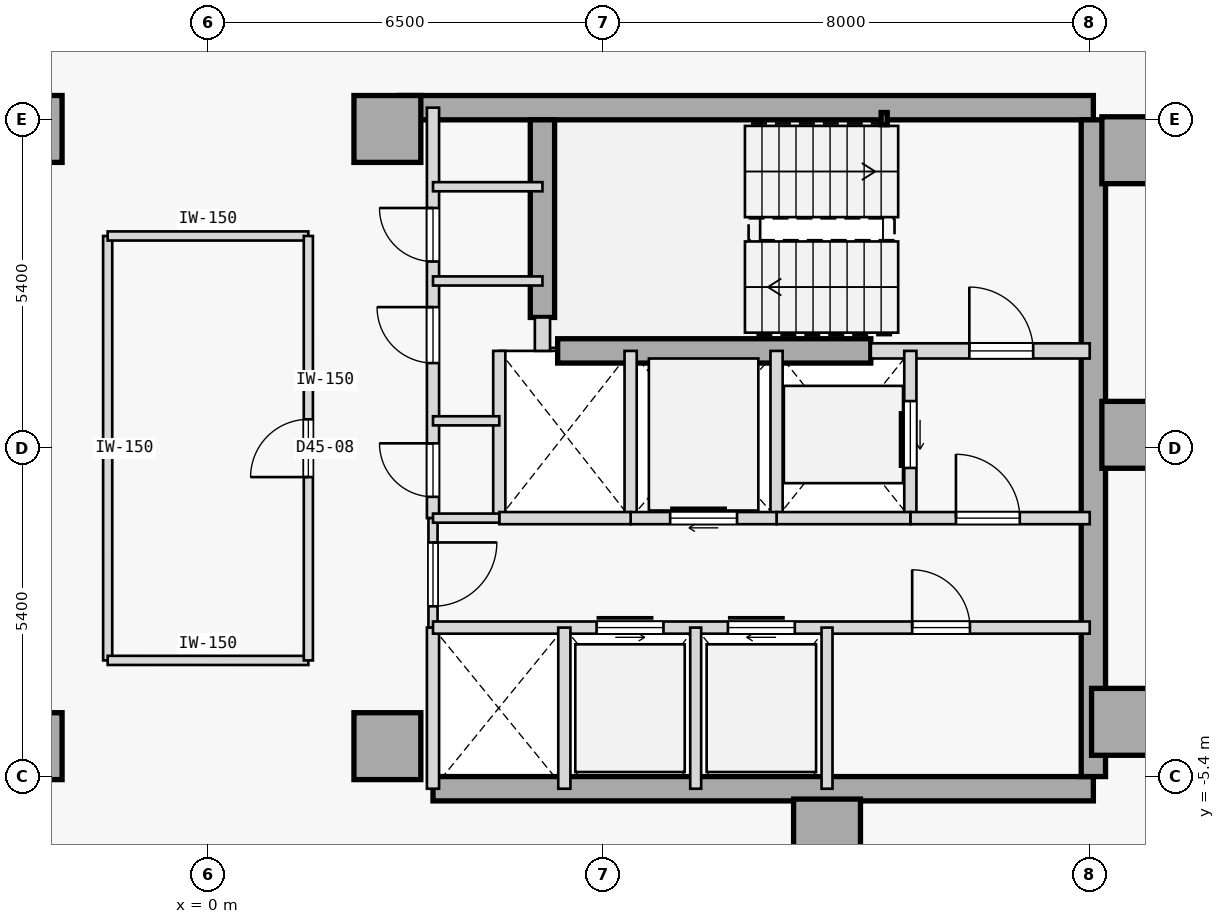
"""IFC4 building model, lengths in metres.
Left out: names, types, materials, properties, quantities, classifications, styles, units other than length and angle.
Written with IfcOpenShell. Run it as: python <this file> out.ifc"""

import sys

from ifc_helpers import new_model, si_unit, direction, frame, frame_2d, origin, origin_2d, place, context, subcontext, project, spatial, rectangle, hollow_rectangle, extrude, element, fill, save


model = new_model("IFC4")
c1 = context("Model", 3, precision=1e-05, world=origin(), true_north=direction((0.0, 1.0)))
c2 = subcontext(c1, "Body", "Model", "MODEL_VIEW")
j1 = project(units=[si_unit("LENGTHUNIT", "METRE"), si_unit("PLANEANGLEUNIT", "RADIAN")], contexts=[c1])
p1 = place(None, origin())
s1 = spatial("IfcSite", under=j1, at=p1, CompositionType="ELEMENT")
p2 = place(p1, origin())
s2 = spatial("IfcBuilding", under=s1, at=p2, CompositionType="ELEMENT")
p3 = place(p2, frame((0.0, 0.0, 175.2)))
s3 = spatial("IfcBuildingStorey", under=s2, at=p3, CompositionType="ELEMENT", Elevation=175.2)
for number, where, z_axis, x_axis in (
    (1, (-2.95, -4.9, 0.0), (0.0, 0.0, 1.0), (1.0, 0.0, 0.0)),
    (2, (-2.95, 5.25, 0.0), (0.0, 0.0, 1.0), (1.0, 0.0, 0.0)),
    (3, (15.25, 4.9, 0.0), (0.0, 0.0, 1.0), (1.0, 0.0, 0.0)),
    (4, (15.25, 0.22, 0.0), (0.0, 0.0, 1.0), (1.0, 0.0, 0.0)),
    (5, (15.08, -4.5, 0.0), (0.0, 0.0, 1.0), (1.0, 0.0, 0.0)),
    (6, (10.18, -6.32, 0.0), (0.0, 0.0, 1.0), (1.0, 0.0, 0.0)),
    (7, (2.95, -4.9, 0.0), (0.0, 0.0, 1.0), (1.0, 0.0, 0.0)),
    (8, (2.95, 5.25, 0.0), (0.0, 0.0, 1.0), (1.0, 0.0, 0.0)),
):
    element("IfcColumn", number, at=place(p3, frame(where, z_axis=z_axis, x_axis=x_axis)), inside=s3, PredefinedType="COLUMN", context=c2, shape_type="SweptSolid", body=[
        extrude(rectangle(XDim=1.1, YDim=1.1, at=origin_2d()), origin(), (0.0, 0.0, 1.0), 3.4),
    ])
p4 = place(p3, frame((3.15, 5.6, 0.0), z_axis=(0.0, 0.0, 1.0), x_axis=(1.0, 0.0, 0.0)))
e9 = element("IfcWall", 9, at=p4, inside=s3, PredefinedType="SHEAR", context=c2, shape_type="SweptSolid", body=[
    extrude(rectangle(XDim=11.41, YDim=0.4, at=frame_2d((5.705, 0.0))), origin(), (0.0, 0.0, 1.0), 3.175),
])
p5 = place(p3, frame((3.7, -5.6, 0.0), z_axis=(0.0, 0.0, 1.0), x_axis=(1.0, 0.0, 0.0)))
e10 = element("IfcWall", 10, at=p5, inside=s3, PredefinedType="SHEAR", context=c2, shape_type="SweptSolid", body=[
    extrude(rectangle(XDim=10.86, YDim=0.4, at=frame_2d((5.43, 0.0))), origin(), (0.0, 0.0, 1.0), 3.175),
])
p6 = place(p3, frame((14.56, -5.4, 0.0), z_axis=(0.0, 0.0, 1.0), x_axis=(0.0, 1.0, 0.0)))
e11 = element("IfcWall", 11, at=p6, inside=s3, PredefinedType="SHEAR", context=c2, shape_type="SweptSolid", body=[
    extrude(rectangle(XDim=10.8, YDim=0.4, at=frame_2d((5.4, 0.0))), origin(), (0.0, 0.0, 1.0), 3.175),
])
p7 = place(p3, frame((5.5, 2.15, 0.0), z_axis=(0.0, 0.0, 1.0), x_axis=(0.0, 1.0, 0.0)))
e12 = element("IfcWall", 12, at=p7, inside=s3, PredefinedType="SHEAR", context=c2, shape_type="SweptSolid", body=[
    extrude(rectangle(XDim=3.25, YDim=0.4, at=frame_2d((1.625, 0.0))), origin(), (0.0, 0.0, 1.0), 3.175),
])
p8 = place(p3, frame((5.75, 1.6, 0.0), z_axis=(0.0, 0.0, 1.0), x_axis=(1.0, 0.0, 0.0)))
e13 = element("IfcWall", 13, at=p8, inside=s3, PredefinedType="SHEAR", context=c2, shape_type="SweptSolid", body=[
    extrude(rectangle(XDim=5.15, YDim=0.4, at=frame_2d((2.575, 0.0))), origin(), (0.0, 0.0, 1.0), 3.175),
])
p9 = place(p3, frame((11.12, 5.42, 0.0), z_axis=(0.0, 0.0, 1.0), x_axis=(1.0, 0.0, 0.0)))
e14 = element("IfcColumn", 14, at=p9, inside=s3, PredefinedType="COLUMN", context=c2, shape_type="SweptSolid", body=[
    extrude(hollow_rectangle(XDim=0.1, YDim=0.2, WallThickness=0.008, at=origin_2d()), origin(), (0.0, 0.0, 1.0), 3.4),
])
p10 = place(p3, frame((10.9, 1.6, 0.0), z_axis=(0.0, 0.0, 1.0), x_axis=(1.0, 0.0, 0.0)))
e15 = element("IfcWall", 15, at=p10, inside=s3, PredefinedType="STANDARD", context=c2, shape_type="SweptSolid", body=[
    extrude(rectangle(XDim=3.6, YDim=0.25, at=frame_2d((1.8, 0.0))), origin(), (0.0, 0.0, 1.0), 3.175),
])
p11 = place(p10, frame((1.62, 0.0, 0.0)))
e16 = element("IfcOpeningElement", 16, at=p11, cuts=e15, PredefinedType="OPENING", context=c2, shape_type="SweptSolid", body=[
    extrude(rectangle(XDim=1.05, YDim=2.15, at=frame_2d((0.525, 1.075))), frame((0.0, 0.135, 0.0), z_axis=(0.0, -1.0, 0.0), x_axis=(1.0, 0.0, 0.0)), (0.0, 0.0, 1.0), 0.27),
])
p12 = place(p3, frame((5.5, 1.6, 0.0), z_axis=(0.0, 0.0, 1.0), x_axis=(0.0, 1.0, 0.0)))
e17 = element("IfcWall", 17, at=p12, inside=s3, PredefinedType="STANDARD", context=c2, shape_type="SweptSolid", body=[
    extrude(rectangle(XDim=0.55, YDim=0.25, at=frame_2d((0.275, 0.0))), origin(), (0.0, 0.0, 1.0), 3.175),
])
p13 = place(p3, frame((3.7, -1.15, 0.0), z_axis=(0.0, 0.0, 1.0), x_axis=(0.0, 1.0, 0.0)))
e18 = element("IfcWall", 18, at=p13, inside=s3, PredefinedType="STANDARD", context=c2, shape_type="SweptSolid", body=[
    extrude(rectangle(XDim=6.75, YDim=0.2, at=frame_2d((3.375, 0.0))), origin(), (0.0, 0.0, 1.0), 3.175),
])
p14 = place(p13, frame((0.35, 0.0, 0.0)))
e19 = element("IfcOpeningElement", 19, at=p14, cuts=e18, PredefinedType="OPENING", context=c2, shape_type="SweptSolid", body=[
    extrude(rectangle(XDim=0.88, YDim=2.15, at=frame_2d((0.44, 1.075))), frame((0.0, 0.11, 0.0), z_axis=(0.0, -1.0, 0.0), x_axis=(1.0, 0.0, 0.0)), (0.0, 0.0, 1.0), 0.22),
])
p15 = place(p13, frame((2.55, 0.0, 0.0)))
e20 = element("IfcOpeningElement", 20, at=p15, cuts=e18, PredefinedType="OPENING", context=c2, shape_type="SweptSolid", body=[
    extrude(rectangle(XDim=0.92, YDim=2.15, at=frame_2d((0.46, 1.075))), frame((0.0, 0.11, 0.0), z_axis=(0.0, -1.0, 0.0), x_axis=(1.0, 0.0, 0.0)), (0.0, 0.0, 1.0), 0.22),
])
p16 = place(p13, frame((4.22, 0.0, 0.0)))
e21 = element("IfcOpeningElement", 21, at=p16, cuts=e18, PredefinedType="OPENING", context=c2, shape_type="SweptSolid", body=[
    extrude(rectangle(XDim=0.88, YDim=2.15, at=frame_2d((0.44, 1.075))), frame((0.0, 0.11, 0.0), z_axis=(0.0, -1.0, 0.0), x_axis=(1.0, 0.0, 0.0)), (0.0, 0.0, 1.0), 0.22),
])
p17 = place(p3, frame((3.7, -2.95, 0.0), z_axis=(0.0, 0.0, 1.0), x_axis=(0.0, 1.0, 0.0)))
e22 = element("IfcWall", 22, at=p17, inside=s3, PredefinedType="PARTITIONING", context=c2, shape_type="SweptSolid", body=[
    extrude(rectangle(XDim=1.8, YDim=0.15, at=frame_2d((0.9, 0.0))), origin(), (0.0, 0.0, 1.0), 3.175),
])
p18 = place(p17, frame((0.35, 0.0, 0.0)))
e23 = element("IfcOpeningElement", 23, at=p18, cuts=e22, PredefinedType="OPENING", context=c2, shape_type="SweptSolid", body=[
    extrude(rectangle(XDim=1.05, YDim=2.18, at=frame_2d((0.525, 1.09))), frame((0.0, 0.085, 0.0), z_axis=(0.0, -1.0, 0.0), x_axis=(1.0, 0.0, 0.0)), (0.0, 0.0, 1.0), 0.17),
])
p19 = place(p3, frame((3.7, -5.6, 0.0), z_axis=(0.0, 0.0, 1.0), x_axis=(0.0, 1.0, 0.0)))
e24 = element("IfcWall", 24, at=p19, inside=s3, PredefinedType="STANDARD", context=c2, shape_type="SweptSolid", body=[
    extrude(rectangle(XDim=2.65, YDim=0.2, at=frame_2d((1.325, 0.0))), origin(), (0.0, 0.0, 1.0), 3.175),
])
p20 = place(p3, frame((11.55, -1.15, 0.0), z_axis=(0.0, 0.0, 1.0), x_axis=(0.0, 1.0, 0.0)))
e25 = element("IfcWall", 25, at=p20, inside=s3, PredefinedType="STANDARD", context=c2, shape_type="SweptSolid", body=[
    extrude(rectangle(XDim=2.75, YDim=0.2, at=frame_2d((1.375, 0.0))), origin(), (0.0, 0.0, 1.0), 3.175),
])
p21 = place(p20, frame((0.825, 0.0, 0.0)))
e26 = element("IfcOpeningElement", 26, at=p21, cuts=e25, PredefinedType="OPENING", context=c2, shape_type="SweptSolid", body=[
    extrude(rectangle(XDim=1.1, YDim=2.15, at=frame_2d((0.55, 1.075))), frame((0.0, 0.11, 0.0), z_axis=(0.0, -1.0, 0.0), x_axis=(1.0, 0.0, 0.0)), (0.0, 0.0, 1.0), 0.22),
])
p22 = place(p3, frame((9.35, -1.15, 0.0), z_axis=(0.0, 0.0, 1.0), x_axis=(0.0, 1.0, 0.0)))
e27 = element("IfcWall", 27, at=p22, inside=s3, PredefinedType="STANDARD", context=c2, shape_type="SweptSolid", body=[
    extrude(rectangle(XDim=2.75, YDim=0.2, at=frame_2d((1.375, 0.0))), origin(), (0.0, 0.0, 1.0), 3.175),
])
p23 = place(p3, frame((11.55, -1.15, 0.0), z_axis=(0.0, 0.0, 1.0), x_axis=(1.0, 0.0, 0.0)))
e28 = element("IfcWall", 28, at=p23, inside=s3, PredefinedType="STANDARD", context=c2, shape_type="SweptSolid", body=[
    extrude(rectangle(XDim=2.95, YDim=0.2, at=frame_2d((1.475, 0.0))), origin(), (0.0, 0.0, 1.0), 3.175),
])
p24 = place(p23, frame((0.75, 0.0, 0.0)))
e29 = element("IfcOpeningElement", 29, at=p24, cuts=e28, PredefinedType="OPENING", context=c2, shape_type="SweptSolid", body=[
    extrude(rectangle(XDim=1.05, YDim=2.18, at=frame_2d((0.525, 1.09))), frame((0.0, 0.11, 0.0), z_axis=(0.0, -1.0, 0.0), x_axis=(1.0, 0.0, 0.0)), (0.0, 0.0, 1.0), 0.22),
])
p25 = place(p3, frame((9.35, -1.15, 0.0), z_axis=(0.0, 0.0, 1.0), x_axis=(1.0, 0.0, 0.0)))
e30 = element("IfcWall", 30, at=p25, inside=s3, PredefinedType="STANDARD", context=c2, shape_type="SweptSolid", body=[
    extrude(rectangle(XDim=2.2, YDim=0.2, at=frame_2d((1.1, 0.0))), origin(), (0.0, 0.0, 1.0), 3.175),
])
p26 = place(p3, frame((6.95, -1.15, 0.0), z_axis=(0.0, 0.0, 1.0), x_axis=(0.0, 1.0, 0.0)))
e31 = element("IfcWall", 31, at=p26, inside=s3, PredefinedType="STANDARD", context=c2, shape_type="SweptSolid", body=[
    extrude(rectangle(XDim=2.75, YDim=0.2, at=frame_2d((1.375, 0.0))), origin(), (0.0, 0.0, 1.0), 3.175),
])
p27 = place(p3, frame((6.95, -1.15, 0.0), z_axis=(0.0, 0.0, 1.0), x_axis=(1.0, 0.0, 0.0)))
e32 = element("IfcWall", 32, at=p27, inside=s3, PredefinedType="STANDARD", context=c2, shape_type="SweptSolid", body=[
    extrude(rectangle(XDim=2.4, YDim=0.2, at=frame_2d((1.2, 0.0))), origin(), (0.0, 0.0, 1.0), 3.175),
])
p28 = place(p27, frame((0.65, 0.0, 0.0)))
e33 = element("IfcOpeningElement", 33, at=p28, cuts=e32, PredefinedType="OPENING", context=c2, shape_type="SweptSolid", body=[
    extrude(rectangle(XDim=1.1, YDim=2.15, at=frame_2d((0.55, 1.075))), frame((0.0, 0.11, 0.0), z_axis=(0.0, -1.0, 0.0), x_axis=(1.0, 0.0, 0.0)), (0.0, 0.0, 1.0), 0.22),
])
p29 = place(p3, frame((4.79, -1.15, 0.0), z_axis=(0.0, 0.0, 1.0), x_axis=(0.0, 1.0, 0.0)))
e34 = element("IfcWall", 34, at=p29, inside=s3, PredefinedType="STANDARD", context=c2, shape_type="SweptSolid", body=[
    extrude(rectangle(XDim=2.75, YDim=0.2, at=frame_2d((1.375, 0.0))), origin(), (0.0, 0.0, 1.0), 3.175),
])
p30 = place(p3, frame((4.79, -1.15, 0.0), z_axis=(0.0, 0.0, 1.0), x_axis=(1.0, 0.0, 0.0)))
e35 = element("IfcWall", 35, at=p30, inside=s3, PredefinedType="STANDARD", context=c2, shape_type="SweptSolid", body=[
    extrude(rectangle(XDim=2.16, YDim=0.2, at=frame_2d((1.08, 0.0))), origin(), (0.0, 0.0, 1.0), 3.175),
])
p31 = place(p3, frame((3.7, -1.15, 0.0), z_axis=(0.0, 0.0, 1.0), x_axis=(1.0, 0.0, 0.0)))
e36 = element("IfcWall", 36, at=p31, inside=s3, PredefinedType="PARTITIONING", context=c2, shape_type="SweptSolid", body=[
    extrude(rectangle(XDim=1.09, YDim=0.15, at=frame_2d((0.545, 0.0))), origin(), (0.0, 0.0, 1.0), 3.175),
])
p32 = place(p3, frame((3.7, -2.95, 0.0), z_axis=(0.0, 0.0, 1.0), x_axis=(1.0, 0.0, 0.0)))
e37 = element("IfcWall", 37, at=p32, inside=s3, PredefinedType="STANDARD", context=c2, shape_type="SweptSolid", body=[
    extrude(rectangle(XDim=10.8, YDim=0.2, at=frame_2d((5.4, 0.0))), origin(), (0.0, 0.0, 1.0), 3.175),
])
p33 = place(p32, frame((2.69, 0.0, 0.0)))
e38 = element("IfcOpeningElement", 38, at=p33, cuts=e37, PredefinedType="OPENING", context=c2, shape_type="SweptSolid", body=[
    extrude(rectangle(XDim=1.1, YDim=2.15, at=frame_2d((0.55, 1.075))), frame((0.0, 0.11, 0.0), z_axis=(0.0, -1.0, 0.0), x_axis=(1.0, 0.0, 0.0)), (0.0, 0.0, 1.0), 0.22),
])
p34 = place(p32, frame((4.85, 0.0, 0.0)))
e39 = element("IfcOpeningElement", 39, at=p34, cuts=e37, PredefinedType="OPENING", context=c2, shape_type="SweptSolid", body=[
    extrude(rectangle(XDim=1.1, YDim=2.15, at=frame_2d((0.55, 1.075))), frame((0.0, 0.11, 0.0), z_axis=(0.0, -1.0, 0.0), x_axis=(1.0, 0.0, 0.0)), (0.0, 0.0, 1.0), 0.22),
])
p35 = place(p32, frame((7.88, 0.0, 0.0)))
e40 = element("IfcOpeningElement", 40, at=p35, cuts=e37, PredefinedType="OPENING", context=c2, shape_type="SweptSolid", body=[
    extrude(rectangle(XDim=0.95, YDim=2.15, at=frame_2d((0.475, 1.075))), frame((0.0, 0.11, 0.0), z_axis=(0.0, -1.0, 0.0), x_axis=(1.0, 0.0, 0.0)), (0.0, 0.0, 1.0), 0.22),
])
p36 = place(p3, frame((5.86, -5.6, 0.0), z_axis=(0.0, 0.0, 1.0), x_axis=(0.0, 1.0, 0.0)))
e41 = element("IfcWall", 41, at=p36, inside=s3, PredefinedType="STANDARD", context=c2, shape_type="SweptSolid", body=[
    extrude(rectangle(XDim=2.65, YDim=0.2, at=frame_2d((1.325, 0.0))), origin(), (0.0, 0.0, 1.0), 3.175),
])
for number, where, z_axis, x_axis in (
    (42, (10.18, -5.6, 0.0), (0.0, 0.0, 1.0), (0.0, 1.0, 0.0)),
    (43, (8.02, -5.6, 0.0), (0.0, 0.0, 1.0), (0.0, 1.0, 0.0)),
):
    element("IfcWall", number, at=place(p3, frame(where, z_axis=z_axis, x_axis=x_axis)), inside=s3, PredefinedType="STANDARD", context=c2, shape_type="SweptSolid", body=[
        extrude(rectangle(XDim=2.65, YDim=0.18, at=frame_2d((1.325, 0.0))), origin(), (0.0, 0.0, 1.0), 3.175),
    ])
p37 = place(p3, frame((3.7, 4.3, 0.0), z_axis=(0.0, 0.0, 1.0), x_axis=(1.0, 0.0, 0.0)))
e44 = element("IfcWall", 44, at=p37, inside=s3, PredefinedType="PARTITIONING", context=c2, shape_type="SweptSolid", body=[
    extrude(rectangle(XDim=1.8, YDim=0.15, at=frame_2d((0.9, 0.0))), origin(), (0.0, 0.0, 1.0), 3.175),
])
p38 = place(p3, frame((3.7, 0.45, 0.0), z_axis=(0.0, 0.0, 1.0), x_axis=(1.0, 0.0, 0.0)))
e45 = element("IfcWall", 45, at=p38, inside=s3, PredefinedType="PARTITIONING", context=c2, shape_type="SweptSolid", body=[
    extrude(rectangle(XDim=1.09, YDim=0.15, at=frame_2d((0.545, 0.0))), origin(), (0.0, 0.0, 1.0), 3.175),
])
p39 = place(p3, frame((3.7, 2.75, 0.0), z_axis=(0.0, 0.0, 1.0), x_axis=(1.0, 0.0, 0.0)))
e46 = element("IfcWall", 46, at=p39, inside=s3, PredefinedType="PARTITIONING", context=c2, shape_type="SweptSolid", body=[
    extrude(rectangle(XDim=1.8, YDim=0.15, at=frame_2d((0.9, 0.0))), origin(), (0.0, 0.0, 1.0), 3.175),
])
p40 = place(p3, frame((-1.65, -3.49, 0.0), z_axis=(0.0, 0.0, 1.0), x_axis=(-3.4979712e-05, 0.999999999388, 0.0)))
e47 = element("IfcWall", 47, at=p40, inside=s3, PredefinedType="PARTITIONING", context=c2, shape_type="SweptSolid", body=[
    extrude(rectangle(XDim=6.979, YDim=0.15, at=frame_2d((3.49, 0.0))), origin(), (0.0, 0.0, 1.0), 3.175),
])
p41 = place(p3, frame((-1.65, -3.49, 0.0), z_axis=(0.0, 0.0, 1.0), x_axis=(0.999999975374, -0.000221926315, 0.0)))
e48 = element("IfcWall", 48, at=p41, inside=s3, PredefinedType="PARTITIONING", context=c2, shape_type="SweptSolid", body=[
    extrude(rectangle(XDim=3.3, YDim=0.15, at=frame_2d((1.65, 0.0))), origin(), (0.0, 0.0, 1.0), 3.175),
])
p42 = place(p3, frame((-1.65, 3.49, 0.0), z_axis=(0.0, 0.0, 1.0), x_axis=(1.0, 0.0, 0.0)))
e49 = element("IfcWall", 49, at=p42, inside=s3, PredefinedType="PARTITIONING", context=c2, shape_type="SweptSolid", body=[
    extrude(rectangle(XDim=3.3, YDim=0.15, at=frame_2d((1.65, 0.0))), origin(), (0.0, 0.0, 1.0), 3.175),
])
p43 = place(p3, frame((1.65, -3.49, 0.0), z_axis=(0.0, 0.0, 1.0), x_axis=(-6.9952083e-05, 0.999999997553, 0.0)))
e50 = element("IfcWall", 50, at=p43, inside=s3, PredefinedType="PARTITIONING", context=c2, shape_type="SweptSolid", body=[
    extrude(rectangle(XDim=6.98, YDim=0.15, at=frame_2d((3.49, 0.0))), origin(), (0.0, 0.0, 1.0), 3.175),
])
p44 = place(p43, frame((3.015, 0.0, 0.0)))
e51 = element("IfcOpeningElement", 51, at=p44, cuts=e50, PredefinedType="OPENING", context=c2, shape_type="SweptSolid", body=[
    extrude(rectangle(XDim=0.95, YDim=2.15, at=frame_2d((0.475, 1.075))), frame((0.0, 0.085, 0.0), z_axis=(0.0, -1.0, 0.0), x_axis=(1.0, 0.0, 0.0)), (0.0, 0.0, 1.0), 0.17),
])
p45 = place(p11, origin())
e52 = element("IfcDoor", 52, at=p45, inside=s3, OperationType="SINGLE_SWING_LEFT", PredefinedType="DOOR", context=c2, shape_type="SweptSolid", body=[
    extrude(rectangle(XDim=1.05, YDim=2.15, at=frame_2d((0.525, 1.075))), frame((0.0, 0.025, 0.0), z_axis=(0.0, -1.0, 0.0), x_axis=(1.0, 0.0, 0.0)), (0.0, 0.0, 1.0), 0.05),
])
fill(e16, e52)
p46 = place(p24, origin())
e53 = element("IfcDoor", 53, at=p46, inside=s3, OperationType="SINGLE_SWING_LEFT", PredefinedType="DOOR", context=c2, shape_type="SweptSolid", body=[
    extrude(rectangle(XDim=1.05, YDim=2.18, at=frame_2d((0.525, 1.09))), frame((0.0, 0.025, 0.0), z_axis=(0.0, -1.0, 0.0), x_axis=(1.0, 0.0, 0.0)), (0.0, 0.0, 1.0), 0.05),
])
fill(e29, e53)
p47 = place(p18, frame((1.05, 0.0, 0.0), z_axis=(0.0, 0.0, 1.0), x_axis=(-1.0, 0.0, 0.0)))
e54 = element("IfcDoor", 54, at=p47, inside=s3, OperationType="SINGLE_SWING_RIGHT", PredefinedType="DOOR", context=c2, shape_type="SweptSolid", body=[
    extrude(rectangle(XDim=1.05, YDim=2.18, at=frame_2d((0.525, 1.09))), frame((0.0, 0.025, 0.0), z_axis=(0.0, -1.0, 0.0), x_axis=(1.0, 0.0, 0.0)), (0.0, 0.0, 1.0), 0.05),
])
fill(e23, e54)
p48 = place(p21, origin())
e55 = element("IfcDoor", 55, at=p48, inside=s3, OperationType="SLIDING_TO_RIGHT", PredefinedType="DOOR", context=c2, shape_type="SweptSolid", body=[
    extrude(rectangle(XDim=1.1, YDim=2.15, at=frame_2d((0.55, 1.075))), frame((0.0, 0.025, 0.0), z_axis=(0.0, -1.0, 0.0), x_axis=(1.0, 0.0, 0.0)), (0.0, 0.0, 1.0), 0.05),
])
fill(e26, e55)
p49 = place(p28, origin())
e56 = element("IfcDoor", 56, at=p49, inside=s3, OperationType="SLIDING_TO_RIGHT", PredefinedType="DOOR", context=c2, shape_type="SweptSolid", body=[
    extrude(rectangle(XDim=1.1, YDim=2.15, at=frame_2d((0.55, 1.075))), frame((0.0, 0.025, 0.0), z_axis=(0.0, -1.0, 0.0), x_axis=(1.0, 0.0, 0.0)), (0.0, 0.0, 1.0), 0.05),
])
fill(e33, e56)
p50 = place(p33, origin())
e57 = element("IfcDoor", 57, at=p50, inside=s3, OperationType="SLIDING_TO_LEFT", PredefinedType="DOOR", context=c2, shape_type="SweptSolid", body=[
    extrude(rectangle(XDim=1.1, YDim=2.15, at=frame_2d((0.55, 1.075))), frame((0.0, 0.025, 0.0), z_axis=(0.0, -1.0, 0.0), x_axis=(1.0, 0.0, 0.0)), (0.0, 0.0, 1.0), 0.05),
])
fill(e38, e57)
p51 = place(p34, origin())
e58 = element("IfcDoor", 58, at=p51, inside=s3, OperationType="SLIDING_TO_RIGHT", PredefinedType="DOOR", context=c2, shape_type="SweptSolid", body=[
    extrude(rectangle(XDim=1.1, YDim=2.15, at=frame_2d((0.55, 1.075))), frame((0.0, 0.025, 0.0), z_axis=(0.0, -1.0, 0.0), x_axis=(1.0, 0.0, 0.0)), (0.0, 0.0, 1.0), 0.05),
])
fill(e39, e58)
p52 = place(p35, origin())
e59 = element("IfcDoor", 59, at=p52, inside=s3, OperationType="SINGLE_SWING_LEFT", PredefinedType="DOOR", context=c2, shape_type="SweptSolid", body=[
    extrude(rectangle(XDim=0.95, YDim=2.15, at=frame_2d((0.475, 1.075))), frame((0.0, 0.025, 0.0), z_axis=(0.0, -1.0, 0.0), x_axis=(1.0, 0.0, 0.0)), (0.0, 0.0, 1.0), 0.05),
])
fill(e40, e59)
p53 = place(p14, origin())
e60 = element("IfcDoor", 60, at=p53, inside=s3, OperationType="SINGLE_SWING_RIGHT", PredefinedType="DOOR", context=c2, shape_type="SweptSolid", body=[
    extrude(rectangle(XDim=0.88, YDim=2.15, at=frame_2d((0.44, 1.075))), frame((0.0, 0.025, 0.0), z_axis=(0.0, -1.0, 0.0), x_axis=(1.0, 0.0, 0.0)), (0.0, 0.0, 1.0), 0.05),
])
fill(e19, e60)
p54 = place(p15, origin())
e61 = element("IfcDoor", 61, at=p54, inside=s3, OperationType="SINGLE_SWING_RIGHT", PredefinedType="DOOR", context=c2, shape_type="SweptSolid", body=[
    extrude(rectangle(XDim=0.92, YDim=2.15, at=frame_2d((0.46, 1.075))), frame((0.0, 0.025, 0.0), z_axis=(0.0, -1.0, 0.0), x_axis=(1.0, 0.0, 0.0)), (0.0, 0.0, 1.0), 0.05),
])
fill(e20, e61)
p55 = place(p16, origin())
e62 = element("IfcDoor", 62, at=p55, inside=s3, OperationType="SINGLE_SWING_RIGHT", PredefinedType="DOOR", context=c2, shape_type="SweptSolid", body=[
    extrude(rectangle(XDim=0.88, YDim=2.15, at=frame_2d((0.44, 1.075))), frame((0.0, 0.025, 0.0), z_axis=(0.0, -1.0, 0.0), x_axis=(1.0, 0.0, 0.0)), (0.0, 0.0, 1.0), 0.05),
])
fill(e21, e62)
p56 = place(p44, origin())
e63 = element("IfcDoor", 63, at=p56, inside=s3, OperationType="SINGLE_SWING_LEFT", PredefinedType="DOOR", context=c2, shape_type="SweptSolid", body=[
    extrude(rectangle(XDim=0.95, YDim=2.15, at=frame_2d((0.475, 1.075))), frame((0.0, 0.025, 0.0), z_axis=(0.0, -1.0, 0.0), x_axis=(1.0, 0.0, 0.0)), (0.0, 0.0, 1.0), 0.05),
])
fill(e51, e63)
save(model, sys.argv[1])
